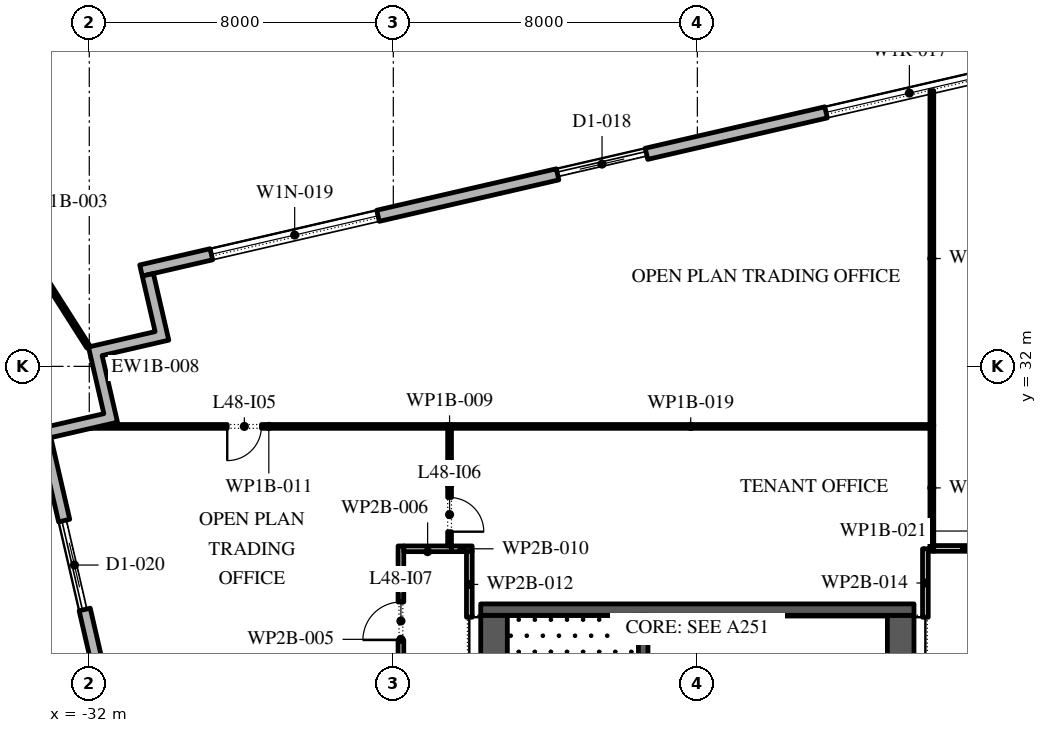
"""IFC4 building model, lengths in metres.
Left out: names, types, materials, properties, quantities, classifications, styles, units other than length and angle.
Written with IfcOpenShell. Run it as: python <this file> out.ifc"""

import sys

from ifc_helpers import new_model, si_unit, direction, frame, frame_2d, origin, place, context, subcontext, project, spatial, polyline, rectangle, outline, extrude, element, fill, save


model = new_model("IFC4")
c1 = context("Model", 3, precision=1e-05, world=origin(), true_north=direction((0.0, 1.0)))
c2 = subcontext(c1, "Body", "Model", "MODEL_VIEW")
j1 = project(units=[si_unit("LENGTHUNIT", "METRE"), si_unit("PLANEANGLEUNIT", "RADIAN")], contexts=[c1])
p1 = place(None, origin())
s1 = spatial("IfcSite", under=j1, at=p1, CompositionType="ELEMENT")
p2 = place(p1, origin())
s2 = spatial("IfcBuilding", under=s1, at=p2, CompositionType="ELEMENT")
p3 = place(p2, frame((0.0, 0.0, 217.8)))
s3 = spatial("IfcBuildingStorey", under=s2, at=p3, CompositionType="ELEMENT", Elevation=217.8)
p4 = place(p3, frame((17.592, 45.657, 0.0), z_axis=(0.0, 0.0, 1.0), x_axis=(-0.974370243697, -0.224950279389, 0.0)))
e1 = element("IfcWall", 1, at=p4, inside=s3, PredefinedType="STANDARD", context=c2, shape_type="SweptSolid", body=[
    extrude(rectangle(XDim=49.5, YDim=0.3, at=frame_2d((24.75, 0.0))), origin(), (0.0, 0.0, 1.0), 3.95),
])
p5 = place(p4, frame((3.6, 0.0, 0.0)))
e2 = element("IfcOpeningElement", 2, at=p5, cuts=e1, PredefinedType="OPENING", context=c2, shape_type="SweptSolid", body=[
    extrude(rectangle(XDim=2.4, YDim=2.85, at=frame_2d((1.2, 1.425))), frame((0.0, 0.16, 0.0), z_axis=(0.0, -1.0, 0.0), x_axis=(1.0, 0.0, 0.0)), (0.0, 0.0, 1.0), 0.32),
])
p6 = place(p4, frame((9.9, 0.0, 0.45)))
e3 = element("IfcOpeningElement", 3, at=p6, cuts=e1, PredefinedType="OPENING", context=c2, shape_type="SweptSolid", body=[
    extrude(rectangle(XDim=4.5, YDim=2.4, at=frame_2d((2.25, 1.2))), frame((0.0, 0.16, 0.0), z_axis=(0.0, -1.0, 0.0), x_axis=(1.0, 0.0, 0.0)), (0.0, 0.0, 1.0), 0.32),
])
p7 = place(p4, frame((18.2, 0.0, 0.45)))
e4 = element("IfcOpeningElement", 4, at=p7, cuts=e1, PredefinedType="OPENING", context=c2, shape_type="SweptSolid", body=[
    extrude(rectangle(XDim=4.5, YDim=2.4, at=frame_2d((2.25, 1.2))), frame((0.0, 0.16, 0.0), z_axis=(0.0, -1.0, 0.0), x_axis=(1.0, 0.0, 0.0)), (0.0, 0.0, 1.0), 0.32),
])
p8 = place(p4, frame((26.5, 0.0, 0.45)))
e5 = element("IfcOpeningElement", 5, at=p8, cuts=e1, PredefinedType="OPENING", context=c2, shape_type="SweptSolid", body=[
    extrude(rectangle(XDim=4.5, YDim=2.4, at=frame_2d((2.25, 1.2))), frame((0.0, 0.16, 0.0), z_axis=(0.0, -1.0, 0.0), x_axis=(1.0, 0.0, 0.0)), (0.0, 0.0, 1.0), 0.32),
])
p9 = place(p4, frame((35.85, 0.0, 0.0)))
e6 = element("IfcOpeningElement", 6, at=p9, cuts=e1, PredefinedType="OPENING", context=c2, shape_type="SweptSolid", body=[
    extrude(rectangle(XDim=2.4, YDim=3.5, at=frame_2d((1.2, 1.75))), frame((0.0, 0.16, 0.0), z_axis=(0.0, -1.0, 0.0), x_axis=(1.0, 0.0, 0.0)), (0.0, 0.0, 1.0), 0.32),
])
p10 = place(p4, frame((43.1, 0.0, 0.45)))
e7 = element("IfcOpeningElement", 7, at=p10, cuts=e1, PredefinedType="OPENING", context=c2, shape_type="SweptSolid", body=[
    extrude(rectangle(XDim=4.5, YDim=2.525, at=frame_2d((2.25, 1.262))), frame((0.0, 0.16, 0.0), z_axis=(0.0, -1.0, 0.0), x_axis=(1.0, 0.0, 0.0)), (0.0, 0.0, 1.0), 0.32),
])
p11 = place(p3, frame((-33.157, 30.092, 0.0), z_axis=(0.0, 0.0, 1.0), x_axis=(0.224950279389, -0.974370243697, 0.0)))
e8 = element("IfcWall", 8, at=p11, inside=s3, PredefinedType="STANDARD", context=c2, shape_type="SweptSolid", body=[
    extrude(rectangle(XDim=49.5, YDim=0.3, at=frame_2d((24.75, 0.0))), origin(), (0.0, 0.0, 1.0), 3.95),
])
p12 = place(p11, frame((2.207, 0.0, 0.0)))
e9 = element("IfcOpeningElement", 9, at=p12, cuts=e8, PredefinedType="OPENING", context=c2, shape_type="SweptSolid", body=[
    extrude(rectangle(XDim=2.4, YDim=3.5, at=frame_2d((1.2, 1.75))), frame((0.0, 0.16, 0.0), z_axis=(0.0, -1.0, 0.0), x_axis=(1.0, 0.0, 0.0)), (0.0, 0.0, 1.0), 0.32),
])
p13 = place(p11, frame((8.121, 0.0, 0.45)))
e10 = element("IfcOpeningElement", 10, at=p13, cuts=e8, PredefinedType="OPENING", context=c2, shape_type="SweptSolid", body=[
    extrude(rectangle(XDim=4.5, YDim=2.775, at=frame_2d((2.25, 1.387))), frame((0.0, 0.16, 0.0), z_axis=(0.0, -1.0, 0.0), x_axis=(1.0, 0.0, 0.0)), (0.0, 0.0, 1.0), 0.32),
])
p14 = place(p11, frame((15.236, 0.0, 0.45)))
e11 = element("IfcOpeningElement", 11, at=p14, cuts=e8, PredefinedType="OPENING", context=c2, shape_type="SweptSolid", body=[
    extrude(rectangle(XDim=4.5, YDim=2.9, at=frame_2d((2.25, 1.45))), frame((0.0, 0.16, 0.0), z_axis=(0.0, -1.0, 0.0), x_axis=(1.0, 0.0, 0.0)), (0.0, 0.0, 1.0), 0.32),
])
p15 = place(p11, frame((22.35, 0.0, 0.45)))
e12 = element("IfcOpeningElement", 12, at=p15, cuts=e8, PredefinedType="OPENING", context=c2, shape_type="SweptSolid", body=[
    extrude(rectangle(XDim=4.5, YDim=2.95, at=frame_2d((2.25, 1.475))), frame((0.0, 0.16, 0.0), z_axis=(0.0, -1.0, 0.0), x_axis=(1.0, 0.0, 0.0)), (0.0, 0.0, 1.0), 0.32),
])
p16 = place(p11, frame((30.514, 0.0, 0.0)))
e13 = element("IfcOpeningElement", 13, at=p16, cuts=e8, PredefinedType="OPENING", context=c2, shape_type="SweptSolid", body=[
    extrude(rectangle(XDim=2.4, YDim=3.5, at=frame_2d((1.2, 1.75))), frame((0.0, 0.16, 0.0), z_axis=(0.0, -1.0, 0.0), x_axis=(1.0, 0.0, 0.0)), (0.0, 0.0, 1.0), 0.32),
])
p17 = place(p11, frame((36.579, 0.0, 0.45)))
e14 = element("IfcOpeningElement", 14, at=p17, cuts=e8, PredefinedType="OPENING", context=c2, shape_type="SweptSolid", body=[
    extrude(rectangle(XDim=4.5, YDim=3.05, at=frame_2d((2.25, 1.525))), frame((0.0, 0.16, 0.0), z_axis=(0.0, -1.0, 0.0), x_axis=(1.0, 0.0, 0.0)), (0.0, 0.0, 1.0), 0.32),
])
p18 = place(p11, frame((43.693, 0.0, 0.45)))
e15 = element("IfcOpeningElement", 15, at=p18, cuts=e8, PredefinedType="OPENING", context=c2, shape_type="SweptSolid", body=[
    extrude(rectangle(XDim=4.5, YDim=3.05, at=frame_2d((2.25, 1.525))), frame((0.0, 0.16, 0.0), z_axis=(0.0, -1.0, 0.0), x_axis=(1.0, 0.0, 0.0)), (0.0, 0.0, 1.0), 0.32),
])
p19 = place(p3, origin())
e16 = element("IfcWall", 16, at=p19, inside=s3, PredefinedType="STANDARD", context=c2, shape_type="SweptSolid", body=[
    extrude(outline(polyline([(-31.617, 30.756), (-32.022, 32.51), (-30.268, 32.914), (-30.605, 34.376), (-30.313, 34.443), (-29.908, 32.69), (-31.662, 32.285), (-31.257, 30.531), (-33.303, 30.058), (-33.371, 30.351), (-31.617, 30.756)])), origin(), (0.0, 0.0, 1.0), 3.95),
])
p20 = place(p3, frame((-32.022, 32.51, -0.05), z_axis=(0.0, 0.0, 1.0), x_axis=(-0.536925404668, 0.843629723174, 0.0)))
e17 = element("IfcWall", 17, at=p20, inside=s3, PredefinedType="STANDARD", context=c2, shape_type="SweptSolid", body=[
    extrude(rectangle(XDim=6.33, YDim=0.1, at=frame_2d((3.165, 0.0))), origin(), (0.0, 0.0, 1.0), 4.0),
])
p21 = place(p3, frame((-21.35, -2.45, 0.0), z_axis=(0.0, 0.0, 1.0), x_axis=(0.0, 1.0, 0.0)))
e18 = element("IfcWall", 18, at=p21, inside=s3, PredefinedType="SHEAR", context=c2, shape_type="SweptSolid", body=[
    extrude(rectangle(XDim=27.9, YDim=0.7, at=frame_2d((13.95, 0.0))), origin(), (0.0, 0.0, 1.0), 3.95),
])
p22 = place(p21, frame((5.05, 0.0, 0.0)))
e19 = element("IfcOpeningElement", 19, at=p22, cuts=e18, PredefinedType="OPENING", context=c2, shape_type="SweptSolid", body=[
    extrude(rectangle(XDim=1.2, YDim=2.1, at=frame_2d((0.6, 1.05))), frame((0.0, 0.36, 0.0), z_axis=(0.0, -1.0, 0.0), x_axis=(1.0, 0.0, 0.0)), (0.0, 0.0, 1.0), 0.72),
])
p23 = place(p21, frame((21.65, 0.0, 0.0)))
e20 = element("IfcOpeningElement", 20, at=p23, cuts=e18, PredefinedType="OPENING", context=c2, shape_type="SweptSolid", body=[
    extrude(rectangle(XDim=1.2, YDim=2.1, at=frame_2d((0.6, 1.05))), frame((0.0, 0.36, 0.0), z_axis=(0.0, -1.0, 0.0), x_axis=(1.0, 0.0, 0.0)), (0.0, 0.0, 1.0), 0.72),
])
p24 = place(p3, frame((-10.65, -2.45, 0.0), z_axis=(0.0, 0.0, 1.0), x_axis=(0.0, 1.0, 0.0)))
e21 = element("IfcWall", 21, at=p24, inside=s3, PredefinedType="SHEAR", context=c2, shape_type="SweptSolid", body=[
    extrude(rectangle(XDim=27.9, YDim=0.7, at=frame_2d((13.95, 0.0))), origin(), (0.0, 0.0, 1.0), 3.95),
])
p25 = place(p24, frame((23.65, 0.0, 0.0)))
e22 = element("IfcOpeningElement", 22, at=p25, cuts=e21, PredefinedType="OPENING", context=c2, shape_type="SweptSolid", body=[
    extrude(rectangle(XDim=2.4, YDim=2.1, at=frame_2d((1.2, 1.05))), frame((0.0, 0.36, 0.0), z_axis=(0.0, -1.0, 0.0), x_axis=(1.0, 0.0, 0.0)), (0.0, 0.0, 1.0), 0.72),
])
p26 = place(p24, frame((1.087, 0.0, 0.0)))
e23 = element("IfcOpeningElement", 23, at=p26, cuts=e21, PredefinedType="OPENING", context=c2, shape_type="SweptSolid", body=[
    extrude(rectangle(XDim=0.9, YDim=2.1, at=frame_2d((0.45, 1.05))), frame((0.0, 0.36, 0.0), z_axis=(0.0, -1.0, 0.0), x_axis=(1.0, 0.0, 0.0)), (0.0, 0.0, 1.0), 0.72),
])
p27 = place(p24, frame((4.262, 0.0, 0.0)))
e24 = element("IfcOpeningElement", 24, at=p27, cuts=e21, PredefinedType="OPENING", context=c2, shape_type="SweptSolid", body=[
    extrude(rectangle(XDim=1.0, YDim=2.1, at=frame_2d((0.5, 1.05))), frame((0.0, 0.36, 0.0), z_axis=(0.0, -1.0, 0.0), x_axis=(1.0, 0.0, 0.0)), (0.0, 0.0, 1.0), 0.72),
])
p28 = place(p3, frame((-21.7, 25.6, 0.0), z_axis=(0.0, 0.0, 1.0), x_axis=(1.0, 0.0, 0.0)))
e25 = element("IfcWall", 25, at=p28, inside=s3, PredefinedType="SHEAR", context=c2, shape_type="SweptSolid", body=[
    extrude(rectangle(XDim=11.4, YDim=0.3, at=frame_2d((5.7, 0.0))), origin(), (0.0, 0.0, 1.0), 3.95),
])
p29 = place(p3, frame((-17.425, 19.15, 0.0), z_axis=(0.0, 0.0, 1.0), x_axis=(0.0, 1.0, 0.0)))
e26 = element("IfcWall", 26, at=p29, inside=s3, PredefinedType="SHEAR", context=c2, shape_type="SweptSolid", body=[
    extrude(rectangle(XDim=6.3, YDim=0.25, at=frame_2d((3.15, 0.0))), origin(), (0.0, 0.0, 1.0), 3.95),
])
p30 = place(p29, frame((0.05, 0.0, 0.0)))
e27 = element("IfcOpeningElement", 27, at=p30, cuts=e26, PredefinedType="OPENING", context=c2, shape_type="SweptSolid", body=[
    extrude(rectangle(XDim=1.2, YDim=2.1, at=frame_2d((0.6, 1.05))), frame((0.0, 0.135, 0.0), z_axis=(0.0, -1.0, 0.0), x_axis=(1.0, 0.0, 0.0)), (0.0, 0.0, 1.0), 0.27),
])
p31 = place(p3, frame((-23.8, 22.36, 0.0), z_axis=(0.0, 0.0, 1.0), x_axis=(0.0, 1.0, 0.0)))
e28 = element("IfcWall", 28, at=p31, inside=s3, PredefinedType="PARTITIONING", context=c2, shape_type="SweptSolid", body=[
    extrude(rectangle(XDim=4.915, YDim=0.15, at=frame_2d((2.458, 0.0))), origin(), (0.0, 0.0, 1.0), 3.95),
])
p32 = place(p31, frame((2.44, 0.0, 0.0)))
e29 = element("IfcOpeningElement", 29, at=p32, cuts=e28, PredefinedType="OPENING", context=c2, shape_type="SweptSolid", body=[
    extrude(rectangle(XDim=1.0, YDim=2.1, at=frame_2d((0.5, 1.05))), frame((0.0, 0.085, 0.0), z_axis=(0.0, -1.0, 0.0), x_axis=(1.0, 0.0, 0.0)), (0.0, 0.0, 1.0), 0.17),
])
p33 = place(p3, frame((-23.725, 27.2, 0.0), z_axis=(0.0, 0.0, 1.0), x_axis=(1.0, 0.0, 0.0)))
e30 = element("IfcWall", 30, at=p33, inside=s3, PredefinedType="PARTITIONING", context=c2, shape_type="SweptSolid", body=[
    extrude(rectangle(XDim=1.255, YDim=0.15, at=frame_2d((0.627, 0.0))), origin(), (0.0, 0.0, 1.0), 3.95),
])
p34 = place(p3, frame((-22.52, 27.275, 0.0), z_axis=(0.0, 0.0, 1.0), x_axis=(0.0, 1.0, 0.0)))
e31 = element("IfcWall", 31, at=p34, inside=s3, PredefinedType="PARTITIONING", context=c2, shape_type="SweptSolid", body=[
    extrude(rectangle(XDim=3.195, YDim=0.1, at=frame_2d((1.598, 0.0))), origin(), (0.0, 0.0, 1.0), 3.95),
])
p35 = place(p34, frame((0.375, 0.0, 0.0)))
e32 = element("IfcOpeningElement", 32, at=p35, cuts=e31, PredefinedType="OPENING", context=c2, shape_type="SweptSolid", body=[
    extrude(rectangle(XDim=0.9, YDim=2.1, at=frame_2d((0.45, 1.05))), frame((0.0, 0.06, 0.0), z_axis=(0.0, -1.0, 0.0), x_axis=(1.0, 0.0, 0.0)), (0.0, 0.0, 1.0), 0.12),
])
p36 = place(p3, frame((-22.47, 27.2, 0.0), z_axis=(0.0, 0.0, 1.0), x_axis=(1.0, 0.0, 0.0)))
e33 = element("IfcWall", 33, at=p36, inside=s3, PredefinedType="PARTITIONING", context=c2, shape_type="SweptSolid", body=[
    extrude(rectangle(XDim=0.545, YDim=0.15, at=frame_2d((0.272, 0.0))), origin(), (0.0, 0.0, 1.0), 3.95),
])
p37 = place(p3, frame((-22.57, 30.42, 0.0), z_axis=(0.0, 0.0, 1.0), x_axis=(-1.0, 0.0, 0.0)))
e34 = element("IfcWall", 34, at=p37, inside=s3, PredefinedType="PARTITIONING", context=c2, shape_type="SweptSolid", body=[
    extrude(rectangle(XDim=9.412, YDim=0.1, at=frame_2d((4.706, 0.0))), origin(), (0.0, 0.0, 1.0), 3.95),
])
p38 = place(p37, frame((4.9, 0.0, 0.0)))
e35 = element("IfcOpeningElement", 35, at=p38, cuts=e34, PredefinedType="OPENING", context=c2, shape_type="SweptSolid", body=[
    extrude(rectangle(XDim=0.9, YDim=2.1, at=frame_2d((0.45, 1.05))), frame((0.0, 0.06, 0.0), z_axis=(0.0, -1.0, 0.0), x_axis=(1.0, 0.0, 0.0)), (0.0, 0.0, 1.0), 0.12),
])
p39 = place(p3, frame((-22.0, 27.125, 0.0), z_axis=(0.0, 0.0, 1.0), x_axis=(0.0, -1.0, 0.0)))
e36 = element("IfcWall", 36, at=p39, inside=s3, PredefinedType="PARTITIONING", context=c2, shape_type="SweptSolid", body=[
    extrude(rectangle(XDim=1.725, YDim=0.15, at=frame_2d((0.863, 0.0))), origin(), (0.0, 0.0, 1.0), 3.95),
])
p40 = place(p3, frame((-10.0, 25.4, 0.0), z_axis=(0.0, 0.0, 1.0), x_axis=(0.0, 1.0, 0.0)))
e37 = element("IfcWall", 37, at=p40, inside=s3, PredefinedType="PARTITIONING", context=c2, shape_type="SweptSolid", body=[
    extrude(rectangle(XDim=1.8, YDim=0.15, at=frame_2d((0.9, 0.0))), origin(), (0.0, 0.0, 1.0), 3.95),
])
p41 = place(p3, frame((-9.83, 27.135, 0.0), z_axis=(0.0, 0.0, 1.0), x_axis=(0.0, 1.0, 0.0)))
e38 = element("IfcWall", 38, at=p41, inside=s3, PredefinedType="PARTITIONING", context=c2, shape_type="SweptSolid", body=[
    extrude(rectangle(XDim=3.335, YDim=0.1, at=frame_2d((1.667, 0.0))), origin(), (0.0, 0.0, 1.0), 3.95),
])
p42 = place(p3, frame((-9.78, 27.21, 0.0), z_axis=(0.0, 0.0, 1.0), x_axis=(1.0, 0.0, 0.0)))
e39 = element("IfcWall", 39, at=p42, inside=s3, PredefinedType="PARTITIONING", context=c2, shape_type="SweptSolid", body=[
    extrude(rectangle(XDim=1.62, YDim=0.15, at=frame_2d((0.81, 0.0))), origin(), (0.0, 0.0, 1.0), 3.95),
])
p43 = place(p3, frame((-9.88, 30.42, 0.0), z_axis=(0.0, 0.0, 1.0), x_axis=(-1.0, 0.0, 0.0)))
e40 = element("IfcWall", 40, at=p43, inside=s3, PredefinedType="PARTITIONING", context=c2, shape_type="SweptSolid", body=[
    extrude(rectangle(XDim=12.59, YDim=0.1, at=frame_2d((6.295, 0.0))), origin(), (0.0, 0.0, 1.0), 3.95),
])
p44 = place(p3, frame((-9.83, 30.42, 0.0), z_axis=(0.0, 0.0, 1.0), x_axis=(0.0, 1.0, 0.0)))
e41 = element("IfcWall", 41, at=p44, inside=s3, PredefinedType="PARTITIONING", context=c2, shape_type="SweptSolid", body=[
    extrude(rectangle(XDim=8.835, YDim=0.1, at=frame_2d((4.417, 0.0))), origin(), (0.0, 0.0, 1.0), 3.95),
])
p45 = place(p8, origin())
e42 = element("IfcWindow", 42, at=p45, inside=s3, PartitioningType="DOUBLE_PANEL_VERTICAL", PredefinedType="WINDOW", context=c2, shape_type="SweptSolid", body=[
    extrude(rectangle(XDim=4.5, YDim=2.4, at=frame_2d((2.25, 1.2))), frame((0.0, 0.03, 0.0), z_axis=(0.0, -1.0, 0.0), x_axis=(1.0, 0.0, 0.0)), (0.0, 0.0, 1.0), 0.06),
])
fill(e5, e42)
p46 = place(p9, origin())
e43 = element("IfcDoor", 43, at=p46, inside=s3, OperationType="DOUBLE_DOOR_SLIDING", PredefinedType="DOOR", context=c2, shape_type="SweptSolid", body=[
    extrude(rectangle(XDim=2.4, YDim=3.5, at=frame_2d((1.2, 1.75))), frame((0.0, 0.025, 0.0), z_axis=(0.0, -1.0, 0.0), x_axis=(1.0, 0.0, 0.0)), (0.0, 0.0, 1.0), 0.05),
])
fill(e6, e43)
p47 = place(p10, origin())
e44 = element("IfcWindow", 44, at=p47, inside=s3, PartitioningType="DOUBLE_PANEL_VERTICAL", PredefinedType="WINDOW", context=c2, shape_type="SweptSolid", body=[
    extrude(rectangle(XDim=4.5, YDim=2.525, at=frame_2d((2.25, 1.262))), frame((0.0, 0.03, 0.0), z_axis=(0.0, -1.0, 0.0), x_axis=(1.0, 0.0, 0.0)), (0.0, 0.0, 1.0), 0.06),
])
fill(e7, e44)
p48 = place(p12, origin())
e45 = element("IfcDoor", 45, at=p48, inside=s3, OperationType="DOUBLE_DOOR_SLIDING", PredefinedType="DOOR", context=c2, shape_type="SweptSolid", body=[
    extrude(rectangle(XDim=2.4, YDim=3.5, at=frame_2d((1.2, 1.75))), frame((0.0, 0.025, 0.0), z_axis=(0.0, -1.0, 0.0), x_axis=(1.0, 0.0, 0.0)), (0.0, 0.0, 1.0), 0.05),
])
fill(e9, e45)
p49 = place(p38, origin())
e46 = element("IfcDoor", 46, at=p49, inside=s3, OperationType="SINGLE_SWING_LEFT", PredefinedType="DOOR", context=c2, shape_type="SweptSolid", body=[
    extrude(rectangle(XDim=0.9, YDim=2.1, at=frame_2d((0.45, 1.05))), frame((0.0, 0.025, 0.0), z_axis=(0.0, -1.0, 0.0), x_axis=(1.0, 0.0, 0.0)), (0.0, 0.0, 1.0), 0.05),
])
fill(e35, e46)
p50 = place(p35, frame((0.9, 0.0, 0.0), z_axis=(0.0, 0.0, 1.0), x_axis=(-1.0, 0.0, 0.0)))
e47 = element("IfcDoor", 47, at=p50, inside=s3, OperationType="SINGLE_SWING_LEFT", PredefinedType="DOOR", context=c2, shape_type="SweptSolid", body=[
    extrude(rectangle(XDim=0.9, YDim=2.1, at=frame_2d((0.45, 1.05))), frame((0.0, 0.025, 0.0), z_axis=(0.0, -1.0, 0.0), x_axis=(1.0, 0.0, 0.0)), (0.0, 0.0, 1.0), 0.05),
])
fill(e32, e47)
p51 = place(p32, origin())
e48 = element("IfcDoor", 48, at=p51, inside=s3, OperationType="SINGLE_SWING_RIGHT", PredefinedType="DOOR", context=c2, shape_type="SweptSolid", body=[
    extrude(rectangle(XDim=1.0, YDim=2.1, at=frame_2d((0.5, 1.05))), frame((0.0, 0.025, 0.0), z_axis=(0.0, -1.0, 0.0), x_axis=(1.0, 0.0, 0.0)), (0.0, 0.0, 1.0), 0.05),
])
fill(e29, e48)
save(model, sys.argv[1])
